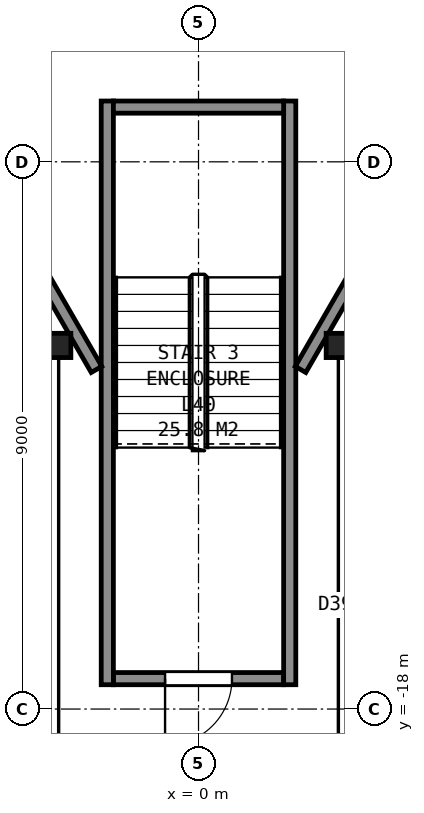
"""IFC4 building model, lengths in metres.
Left out: names, types, materials, properties, quantities, classifications, styles, units other than length and angle.
Written with IfcOpenShell. Run it as: python <this file> out.ifc"""

import sys

from ifc_helpers import new_model, si_unit, direction, frame, frame_2d, origin, origin_2d, place, context, subcontext, project, spatial, rectangle, i_section, extrude, element, fill, save


model = new_model("IFC4")
c1 = context("Model", 3, precision=1e-05, world=origin(), true_north=direction((0.0, 1.0)))
c2 = subcontext(c1, "Body", "Model", "MODEL_VIEW")
j1 = project(units=[si_unit("LENGTHUNIT", "METRE"), si_unit("PLANEANGLEUNIT", "RADIAN")], contexts=[c1])
p1 = place(None, origin())
s1 = spatial("IfcSite", under=j1, at=p1, CompositionType="ELEMENT")
p2 = place(p1, origin())
s2 = spatial("IfcBuilding", under=s1, at=p2, CompositionType="ELEMENT")
p3 = place(p2, frame((0.0, 0.0, 163.6)))
s3 = spatial("IfcBuildingStorey", under=s2, at=p3, CompositionType="ELEMENT", Elevation=163.6)
for number, where, z_axis, x_axis in (
    (1, (-2.3, -12.02, 0.0), (0.0, 0.0, 1.0), (1.0, 0.0, 0.0)),
    (2, (2.3, -12.02, 0.0), (0.0, 0.0, 1.0), (1.0, 0.0, 0.0)),
):
    element("IfcColumn", number, at=place(p3, frame(where, z_axis=z_axis, x_axis=x_axis)), inside=s3, PredefinedType="COLUMN", context=c2, shape_type="SweptSolid", body=[
        extrude(i_section(OverallWidth=0.401, OverallDepth=0.399, WebThickness=0.025, FlangeThickness=0.04, FilletRadius=0.015, at=origin_2d()), origin(), (0.0, 0.0, 1.0), 3.7),
    ])
p4 = place(p3, frame((-1.4, -17.5, 0.0), z_axis=(0.0, 0.0, 1.0), x_axis=(1.0, 0.0, 0.0)))
e3 = element("IfcWall", 3, at=p4, inside=s3, PredefinedType="PARTITIONING", context=c2, shape_type="SweptSolid", body=[
    extrude(rectangle(XDim=2.8, YDim=0.2, at=frame_2d((1.4, 0.0))), origin(), (0.0, 0.0, 1.0), 3.45),
])
p5 = place(p4, frame((0.85, 0.0, 0.0)))
e4 = element("IfcOpeningElement", 4, at=p5, cuts=e3, PredefinedType="OPENING", context=c2, shape_type="SweptSolid", body=[
    extrude(rectangle(XDim=1.1, YDim=2.1, at=frame_2d((0.55, 1.05))), frame((0.0, 0.11, 0.0), z_axis=(0.0, -1.0, 0.0), x_axis=(1.0, 0.0, 0.0)), (0.0, 0.0, 1.0), 0.22),
])
for number, where, z_axis, x_axis in (
    (5, (1.5, -8.0, 0.0), (0.0, 0.0, 1.0), (0.0, -1.0, 0.0)),
    (6, (-1.5, -8.0, 0.0), (0.0, 0.0, 1.0), (0.0, -1.0, 0.0)),
):
    element("IfcWall", number, at=place(p3, frame(where, z_axis=z_axis, x_axis=x_axis)), inside=s3, PredefinedType="PARTITIONING", context=c2, shape_type="SweptSolid", body=[
        extrude(rectangle(XDim=9.6, YDim=0.2, at=frame_2d((4.8, 0.0))), origin(), (0.0, 0.0, 1.0), 3.45),
    ])
p6 = place(p3, frame((-1.4, -8.1, 0.0), z_axis=(0.0, 0.0, 1.0), x_axis=(1.0, 0.0, 0.0)))
e7 = element("IfcWall", 7, at=p6, inside=s3, PredefinedType="PARTITIONING", context=c2, shape_type="SweptSolid", body=[
    extrude(rectangle(XDim=2.8, YDim=0.2, at=frame_2d((1.4, 0.0))), origin(), (0.0, 0.0, 1.0), 3.45),
])
p7 = place(p3, frame((-4.655, -7.257, 0.0), z_axis=(0.0, 0.0, 1.0), x_axis=(0.499966124405, -0.866044960985, 0.0)))
e8 = element("IfcWall", 8, at=p7, inside=s3, PredefinedType="PARTITIONING", context=c2, shape_type="SweptSolid", body=[
    extrude(rectangle(XDim=5.956, YDim=0.2, at=frame_2d((2.978, 0.0))), origin(), (0.0, 0.0, 1.0), 3.45),
])
p8 = place(p3, frame((1.677, -12.415, 0.0), z_axis=(0.0, 0.0, 1.0), x_axis=(0.500054337157, 0.865994029939, 0.0)))
e9 = element("IfcWall", 9, at=p8, inside=s3, PredefinedType="PARTITIONING", context=c2, shape_type="SweptSolid", body=[
    extrude(rectangle(XDim=6.177, YDim=0.2, at=frame_2d((3.088, 0.0))), origin(), (0.0, 0.0, 1.0), 3.45),
])
p9 = place(p8, frame((3.695, 0.0, 0.0)))
e10 = element("IfcOpeningElement", 10, at=p9, cuts=e9, PredefinedType="OPENING", context=c2, shape_type="SweptSolid", body=[
    extrude(rectangle(XDim=1.8, YDim=2.1, at=frame_2d((0.9, 1.05))), frame((0.0, 0.11, 0.0), z_axis=(0.0, -1.0, 0.0), x_axis=(1.0, 0.0, 0.0)), (0.0, 0.0, 1.0), 0.22),
])
p10 = place(p5, origin())
e11 = element("IfcDoor", 11, at=p10, inside=s3, OperationType="SINGLE_SWING_LEFT", PredefinedType="DOOR", context=c2, shape_type="SweptSolid", body=[
    extrude(rectangle(XDim=1.1, YDim=2.1, at=frame_2d((0.55, 1.05))), frame((0.0, 0.025, 0.0), z_axis=(0.0, -1.0, 0.0), x_axis=(1.0, 0.0, 0.0)), (0.0, 0.0, 1.0), 0.05),
])
fill(e4, e11)
save(model, sys.argv[1])
